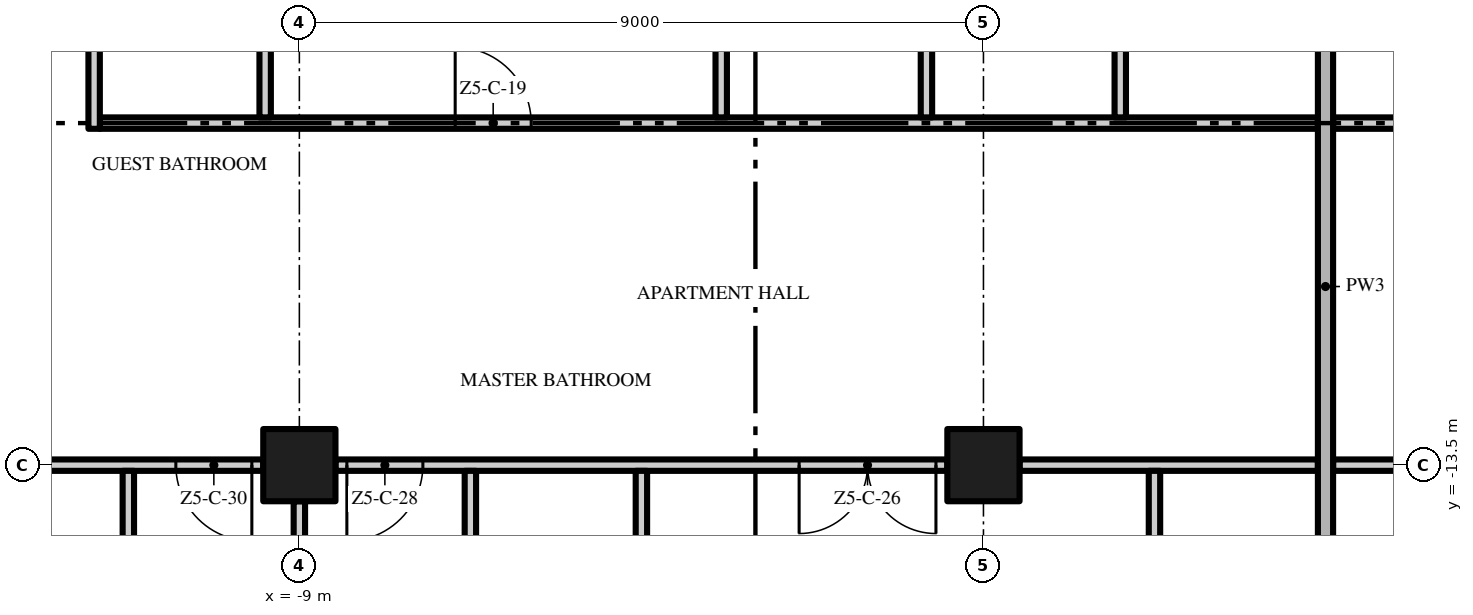
"""IFC4 building model, lengths in metres.
Left out: names, types, materials, properties, quantities, classifications, styles, units other than length and angle.
Written with IfcOpenShell. Run it as: python <this file> out.ifc"""

import sys

from ifc_helpers import new_model, si_unit, direction, frame, frame_2d, origin, origin_2d, place, context, subcontext, project, spatial, rectangle, extrude, element, fill, save


model = new_model("IFC4")
c1 = context("Model", 3, precision=1e-05, world=origin(), true_north=direction((0.0, 1.0)))
c2 = subcontext(c1, "Body", "Model", "MODEL_VIEW")
j1 = project(units=[si_unit("LENGTHUNIT", "METRE"), si_unit("PLANEANGLEUNIT", "RADIAN")], contexts=[c1])
p1 = place(None, origin())
s1 = spatial("IfcSite", under=j1, at=p1, CompositionType="ELEMENT")
p2 = place(p1, origin())
s2 = spatial("IfcBuilding", under=s1, at=p2, CompositionType="ELEMENT")
p3 = place(p2, frame((0.0, 0.0, 269.2)))
s3 = spatial("IfcBuildingStorey", under=s2, at=p3, CompositionType="ELEMENT", Elevation=269.2)
for number, where, z_axis, x_axis in (
    (1, (-9.0, -13.5, 0.0), (0.0, 0.0, 1.0), (1.0, 0.0, 0.0)),
    (2, (0.0, -13.5, 0.0), (0.0, 0.0, 1.0), (1.0, 0.0, 0.0)),
):
    element("IfcColumn", number, at=place(p3, frame(where, z_axis=z_axis, x_axis=x_axis)), inside=s3, PredefinedType="COLUMN", context=c2, shape_type="SweptSolid", body=[
        extrude(rectangle(XDim=0.95, YDim=0.95, at=origin_2d()), origin(), (0.0, 0.0, 1.0), 3.5),
    ])
p4 = place(p3, frame((-9.475, -13.5, 0.0), z_axis=(0.0, 0.0, 1.0), x_axis=(-1.0, 0.0, 0.0)))
e3 = element("IfcWall", 3, at=p4, inside=s3, PredefinedType="PARTITIONING", context=c2, shape_type="SweptSolid", body=[
    extrude(rectangle(XDim=8.05, YDim=0.15, at=frame_2d((4.025, 0.0))), origin(), (0.0, 0.0, 1.0), 3.5),
])
p5 = place(p4, frame((0.15, 0.0, 0.0)))
e4 = element("IfcOpeningElement", 4, at=p5, cuts=e3, PredefinedType="OPENING", context=c2, shape_type="SweptSolid", body=[
    extrude(rectangle(XDim=1.0, YDim=2.4, at=frame_2d((0.5, 1.2))), frame((0.0, 0.085, 0.0), z_axis=(0.0, -1.0, 0.0), x_axis=(1.0, 0.0, 0.0)), (0.0, 0.0, 1.0), 0.17),
])
p6 = place(p4, frame((6.9, 0.0, 0.0)))
e5 = element("IfcOpeningElement", 5, at=p6, cuts=e3, PredefinedType="OPENING", context=c2, shape_type="SweptSolid", body=[
    extrude(rectangle(XDim=1.0, YDim=2.4, at=frame_2d((0.5, 1.2))), frame((0.0, 0.085, 0.0), z_axis=(0.0, -1.0, 0.0), x_axis=(1.0, 0.0, 0.0)), (0.0, 0.0, 1.0), 0.17),
])
p7 = place(p3, frame((-0.475, -13.5, 0.0), z_axis=(0.0, 0.0, 1.0), x_axis=(-1.0, 0.0, 0.0)))
e6 = element("IfcWall", 6, at=p7, inside=s3, PredefinedType="PARTITIONING", context=c2, shape_type="SweptSolid", body=[
    extrude(rectangle(XDim=8.05, YDim=0.15, at=frame_2d((4.025, 0.0))), origin(), (0.0, 0.0, 1.0), 3.5),
])
p8 = place(p7, frame((0.15, 0.0, 0.0)))
e7 = element("IfcOpeningElement", 7, at=p8, cuts=e6, PredefinedType="OPENING", context=c2, shape_type="SweptSolid", body=[
    extrude(rectangle(XDim=1.8, YDim=2.4, at=frame_2d((0.9, 1.2))), frame((0.0, 0.085, 0.0), z_axis=(0.0, -1.0, 0.0), x_axis=(1.0, 0.0, 0.0)), (0.0, 0.0, 1.0), 0.17),
])
p9 = place(p7, frame((6.9, 0.0, 0.0)))
e8 = element("IfcOpeningElement", 8, at=p9, cuts=e6, PredefinedType="OPENING", context=c2, shape_type="SweptSolid", body=[
    extrude(rectangle(XDim=1.0, YDim=2.4, at=frame_2d((0.5, 1.2))), frame((0.0, 0.085, 0.0), z_axis=(0.0, -1.0, 0.0), x_axis=(1.0, 0.0, 0.0)), (0.0, 0.0, 1.0), 0.17),
])
for number, where, z_axis, x_axis in (
    (9, (0.475, -13.5, 0.0), (0.0, 0.0, 1.0), (1.0, 0.0, 0.0)),
    (10, (4.6, -13.5, 0.0), (0.0, 0.0, 1.0), (1.0, 0.0, 0.0)),
):
    element("IfcWall", number, at=place(p3, frame(where, z_axis=z_axis, x_axis=x_axis)), inside=s3, PredefinedType="PARTITIONING", context=c2, shape_type="SweptSolid", body=[
        extrude(rectangle(XDim=3.925, YDim=0.15, at=frame_2d((1.962, 0.0))), origin(), (0.0, 0.0, 1.0), 3.5),
    ])
p10 = place(p3, frame((-11.625, -9.0, 0.0), z_axis=(0.0, 0.0, 1.0), x_axis=(1.0, 0.0, 0.0)))
e11 = element("IfcWall", 11, at=p10, inside=s3, PredefinedType="PARTITIONING", context=c2, shape_type="SweptSolid", body=[
    extrude(rectangle(XDim=16.025, YDim=0.15, at=frame_2d((8.012, 0.0))), origin(), (0.0, 0.0, 1.0), 3.5),
])
p11 = place(p10, frame((4.675, 0.0, 0.0)))
e12 = element("IfcOpeningElement", 12, at=p11, cuts=e11, PredefinedType="OPENING", context=c2, shape_type="SweptSolid", body=[
    extrude(rectangle(XDim=1.0, YDim=2.4, at=frame_2d((0.5, 1.2))), frame((0.0, 0.085, 0.0), z_axis=(0.0, -1.0, 0.0), x_axis=(1.0, 0.0, 0.0)), (0.0, 0.0, 1.0), 0.17),
])
p12 = place(p3, frame((4.6, -9.0, 0.0), z_axis=(0.0, 0.0, 1.0), x_axis=(1.0, 0.0, 0.0)))
e13 = element("IfcWall", 13, at=p12, inside=s3, PredefinedType="PARTITIONING", context=c2, shape_type="SweptSolid", body=[
    extrude(rectangle(XDim=10.025, YDim=0.15, at=frame_2d((5.013, 0.0))), origin(), (0.0, 0.0, 1.0), 3.5),
])
p13 = place(p12, frame((4.35, 0.0, 0.0)))
e14 = element("IfcOpeningElement", 14, at=p13, cuts=e13, PredefinedType="OPENING", context=c2, shape_type="SweptSolid", body=[
    extrude(rectangle(XDim=1.0, YDim=2.4, at=frame_2d((0.5, 1.2))), frame((0.0, 0.085, 0.0), z_axis=(0.0, -1.0, 0.0), x_axis=(1.0, 0.0, 0.0)), (0.0, 0.0, 1.0), 0.17),
])
p14 = place(p3, frame((-11.7, -4.425, 0.0), z_axis=(0.0, 0.0, 1.0), x_axis=(0.0, -1.0, 0.0)))
e15 = element("IfcWall", 15, at=p14, inside=s3, PredefinedType="PARTITIONING", context=c2, shape_type="SweptSolid", body=[
    extrude(rectangle(XDim=4.65, YDim=0.15, at=frame_2d((2.325, 0.0))), origin(), (0.0, 0.0, 1.0), 3.5),
])
p15 = place(p14, frame((1.875, 0.0, 0.0)))
e16 = element("IfcOpeningElement", 16, at=p15, cuts=e15, PredefinedType="OPENING", context=c2, shape_type="SweptSolid", body=[
    extrude(rectangle(XDim=0.9, YDim=2.1, at=frame_2d((0.45, 1.05))), frame((0.0, 0.085, 0.0), z_axis=(0.0, -1.0, 0.0), x_axis=(1.0, 0.0, 0.0)), (0.0, 0.0, 1.0), 0.17),
])
p16 = place(p3, frame((-11.25, -16.575, 0.0), z_axis=(0.0, 0.0, 1.0), x_axis=(0.0, 1.0, 0.0)))
e17 = element("IfcWall", 17, at=p16, inside=s3, PredefinedType="PARTITIONING", context=c2, shape_type="SweptSolid", body=[
    extrude(rectangle(XDim=3.0, YDim=0.15, at=frame_2d((1.5, 0.0))), origin(), (0.0, 0.0, 1.0), 3.5),
])
p17 = place(p3, frame((-9.45, -8.925, 0.0), z_axis=(0.0, 0.0, 1.0), x_axis=(0.0, 1.0, 0.0)))
e18 = element("IfcWall", 18, at=p17, inside=s3, PredefinedType="PARTITIONING", context=c2, shape_type="SweptSolid", body=[
    extrude(rectangle(XDim=3.95, YDim=0.15, at=frame_2d((1.975, 0.0))), origin(), (0.0, 0.0, 1.0), 3.5),
])
p18 = place(p3, frame((-9.0, -21.6, 0.0), z_axis=(0.0, 0.0, 1.0), x_axis=(0.0, 1.0, 0.0)))
e19 = element("IfcWall", 19, at=p18, inside=s3, PredefinedType="PARTITIONING", context=c2, shape_type="SweptSolid", body=[
    extrude(rectangle(XDim=7.625, YDim=0.15, at=frame_2d((3.812, 0.0))), origin(), (0.0, 0.0, 1.0), 3.5),
])
p19 = place(p3, frame((-6.75, -16.575, 0.0), z_axis=(0.0, 0.0, 1.0), x_axis=(0.0, 1.0, 0.0)))
e20 = element("IfcWall", 20, at=p19, inside=s3, PredefinedType="PARTITIONING", context=c2, shape_type="SweptSolid", body=[
    extrude(rectangle(XDim=3.0, YDim=0.15, at=frame_2d((1.5, 0.0))), origin(), (0.0, 0.0, 1.0), 3.5),
])
p20 = place(p3, frame((-4.5, -22.2, 0.0), z_axis=(0.0, 0.0, 1.0), x_axis=(0.0, 1.0, 0.0)))
e21 = element("IfcWall", 21, at=p20, inside=s3, PredefinedType="PARTITIONING", context=c2, shape_type="SweptSolid", body=[
    extrude(rectangle(XDim=8.625, YDim=0.15, at=frame_2d((4.312, 0.0))), origin(), (0.0, 0.0, 1.0), 3.5),
])
for number, where, z_axis, x_axis in (
    (22, (-3.45, -8.925, 0.0), (0.0, 0.0, 1.0), (0.0, 1.0, 0.0)),
    (23, (-0.75, -8.925, 0.0), (0.0, 0.0, 1.0), (0.0, 1.0, 0.0)),
    (24, (1.8, -8.925, 0.0), (0.0, 0.0, 1.0), (0.0, 1.0, 0.0)),
):
    element("IfcWall", number, at=place(p3, frame(where, z_axis=z_axis, x_axis=x_axis)), inside=s3, PredefinedType="PARTITIONING", context=c2, shape_type="SweptSolid", body=[
        extrude(rectangle(XDim=4.35, YDim=0.15, at=frame_2d((2.175, 0.0))), origin(), (0.0, 0.0, 1.0), 3.5),
    ])
p21 = place(p3, frame((2.25, -16.575, 0.0), z_axis=(0.0, 0.0, 1.0), x_axis=(0.0, 1.0, 0.0)))
e25 = element("IfcWall", 25, at=p21, inside=s3, PredefinedType="PARTITIONING", context=c2, shape_type="SweptSolid", body=[
    extrude(rectangle(XDim=3.0, YDim=0.15, at=frame_2d((1.5, 0.0))), origin(), (0.0, 0.0, 1.0), 3.5),
])
p22 = place(p3, frame((4.5, -22.2, 0.0), z_axis=(0.0, 0.0, 1.0), x_axis=(0.0, 1.0, 0.0)))
e26 = element("IfcWall", 26, at=p22, inside=s3, PredefinedType="PARTITIONING", context=c2, shape_type="SweptSolid", body=[
    extrude(rectangle(XDim=22.1, YDim=0.2, at=frame_2d((11.05, 0.0))), origin(), (0.0, 0.0, 1.0), 3.5),
])
p23 = place(p11, origin())
e27 = element("IfcDoor", 27, at=p23, inside=s3, OperationType="SINGLE_SWING_LEFT", PredefinedType="DOOR", context=c2, shape_type="SweptSolid", body=[
    extrude(rectangle(XDim=1.0, YDim=2.4, at=frame_2d((0.5, 1.2))), frame((0.0, 0.025, 0.0), z_axis=(0.0, -1.0, 0.0), x_axis=(1.0, 0.0, 0.0)), (0.0, 0.0, 1.0), 0.05),
])
fill(e12, e27)
p24 = place(p8, origin())
e28 = element("IfcDoor", 28, at=p24, inside=s3, OperationType="DOUBLE_DOOR_SINGLE_SWING", PredefinedType="DOOR", context=c2, shape_type="SweptSolid", body=[
    extrude(rectangle(XDim=1.8, YDim=2.4, at=frame_2d((0.9, 1.2))), frame((0.0, 0.025, 0.0), z_axis=(0.0, -1.0, 0.0), x_axis=(1.0, 0.0, 0.0)), (0.0, 0.0, 1.0), 0.05),
])
fill(e7, e28)
p25 = place(p9, origin())
e29 = element("IfcDoor", 29, at=p25, inside=s3, OperationType="SINGLE_SWING_RIGHT", PredefinedType="DOOR", context=c2, shape_type="SweptSolid", body=[
    extrude(rectangle(XDim=1.0, YDim=2.4, at=frame_2d((0.5, 1.2))), frame((0.0, 0.025, 0.0), z_axis=(0.0, -1.0, 0.0), x_axis=(1.0, 0.0, 0.0)), (0.0, 0.0, 1.0), 0.05),
])
fill(e8, e29)
p26 = place(p5, origin())
e30 = element("IfcDoor", 30, at=p26, inside=s3, OperationType="SINGLE_SWING_LEFT", PredefinedType="DOOR", context=c2, shape_type="SweptSolid", body=[
    extrude(rectangle(XDim=1.0, YDim=2.4, at=frame_2d((0.5, 1.2))), frame((0.0, 0.025, 0.0), z_axis=(0.0, -1.0, 0.0), x_axis=(1.0, 0.0, 0.0)), (0.0, 0.0, 1.0), 0.05),
])
fill(e4, e30)
save(model, sys.argv[1])
